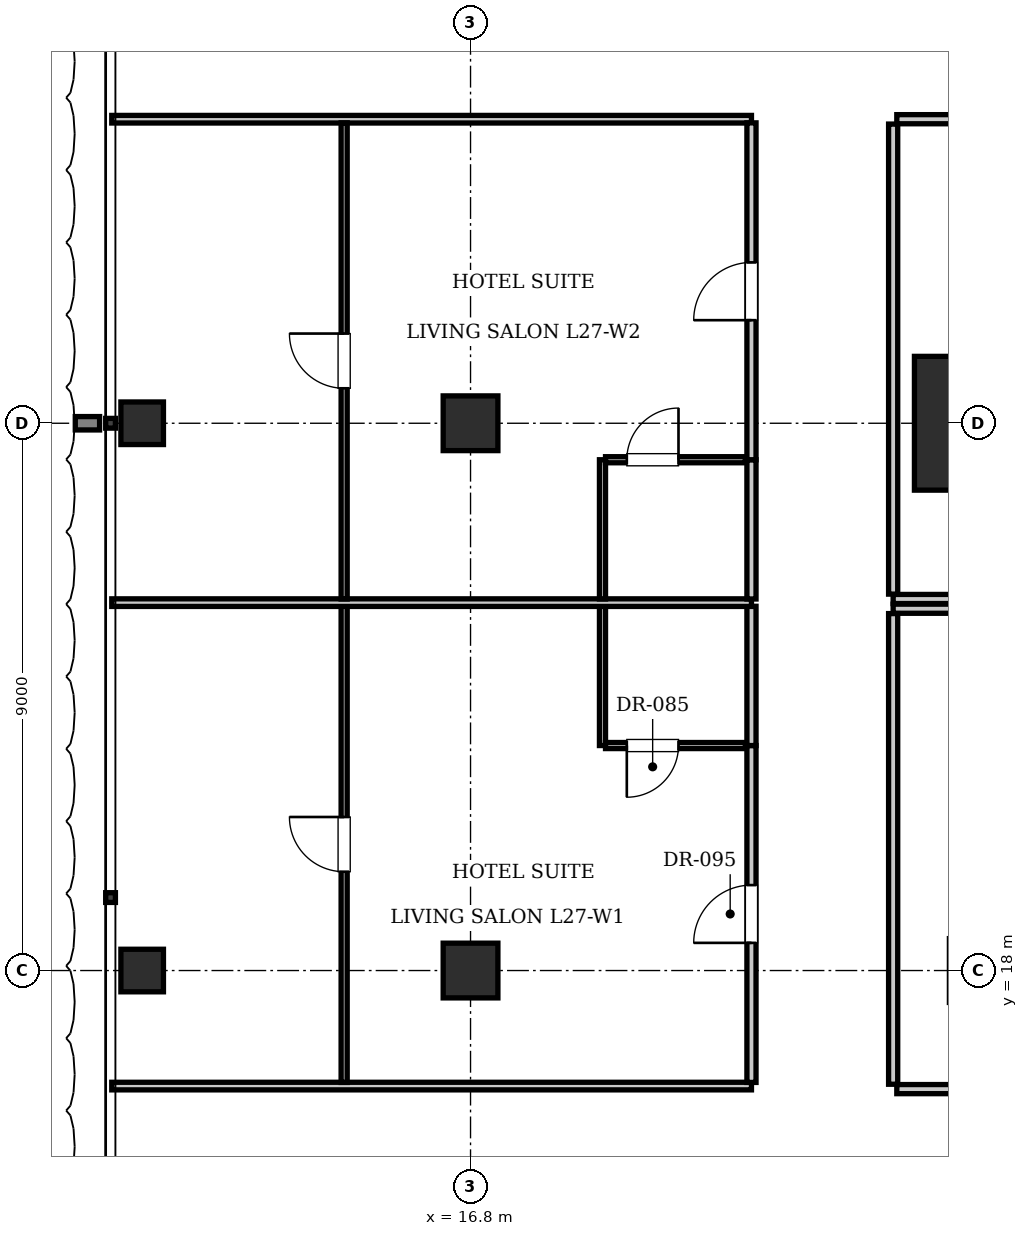
"""IFC4 building model, lengths in metres.
Left out: names, types, materials, properties, quantities, classifications, styles, units other than length and angle.
Written with IfcOpenShell. Run it as: python <this file> out.ifc"""

import sys

from ifc_helpers import new_model, si_unit, direction, frame, frame_2d, origin, origin_2d, place, context, subcontext, project, spatial, rectangle, i_section, extrude, element, fill, save


model = new_model("IFC4")
c1 = context("Model", 3, precision=1e-05, world=origin(), true_north=direction((0.0, 1.0)))
c2 = subcontext(c1, "Body", "Model", "MODEL_VIEW")
j1 = project(units=[si_unit("LENGTHUNIT", "METRE"), si_unit("PLANEANGLEUNIT", "RADIAN")], contexts=[c1])
p1 = place(None, origin())
s1 = spatial("IfcSite", under=j1, at=p1, CompositionType="ELEMENT")
p2 = place(p1, origin())
s2 = spatial("IfcBuilding", under=s1, at=p2, CompositionType="ELEMENT")
p3 = place(p2, frame((0.0, 0.0, 111.65)))
s3 = spatial("IfcBuildingStorey", under=s2, at=p3, CompositionType="ELEMENT", Elevation=111.65)
p4 = place(p3, frame((25.2, 27.0, 0.0), z_axis=(0.0, 0.0, 1.0), x_axis=(1.0, 0.0, 0.0)))
e1 = element("IfcColumn", 1, at=p4, inside=s3, PredefinedType="COLUMN", context=c2, shape_type="SweptSolid", body=[
    extrude(rectangle(XDim=2.2, YDim=2.2, at=origin_2d()), origin(), (0.0, 0.0, 1.0), 3.85),
])
for number, where, z_axis, x_axis in (
    (2, (16.8, 18.0, 0.0), (0.0, 0.0, 1.0), (1.0, 0.0, 0.0)),
    (3, (16.8, 27.0, 0.0), (0.0, 0.0, 1.0), (1.0, 0.0, 0.0)),
):
    element("IfcColumn", number, at=place(p3, frame(where, z_axis=z_axis, x_axis=x_axis)), inside=s3, PredefinedType="COLUMN", context=c2, shape_type="SweptSolid", body=[
        extrude(rectangle(XDim=0.9, YDim=0.9, at=origin_2d()), origin(), (0.0, 0.0, 1.0), 3.85),
    ])
for number, where, z_axis, x_axis in (
    (4, (11.4, 18.0, 0.0), (0.0, 0.0, 1.0), (1.0, 0.0, 0.0)),
    (5, (11.4, 27.0, 0.0), (0.0, 0.0, 1.0), (1.0, 0.0, 0.0)),
):
    element("IfcColumn", number, at=place(p3, frame(where, z_axis=z_axis, x_axis=x_axis)), inside=s3, PredefinedType="COLUMN", context=c2, shape_type="SweptSolid", body=[
        extrude(i_section(OverallWidth=0.7, OverallDepth=0.7, WebThickness=0.028, FlangeThickness=0.044, at=origin_2d()), origin(), (0.0, 0.0, 1.0), 3.85),
    ])
p5 = place(p3, frame((23.75, 24.11, 0.0), z_axis=(0.0, 0.0, 1.0), x_axis=(1.0, 0.0, 0.0)))
e6 = element("IfcWall", 6, at=p5, inside=s3, PredefinedType="PARTITIONING", context=c2, shape_type="SweptSolid", body=[
    extrude(rectangle(XDim=28.1, YDim=0.15, at=frame_2d((14.05, 0.0))), origin(), (0.0, 0.0, 1.0), 3.55),
])
p6 = place(p3, frame((23.75, 24.19, 0.0), z_axis=(0.0, 0.0, 1.0), x_axis=(0.0, 1.0, 0.0)))
e7 = element("IfcWall", 7, at=p6, inside=s3, PredefinedType="PARTITIONING", context=c2, shape_type="SweptSolid", body=[
    extrude(rectangle(XDim=7.73, YDim=0.15, at=frame_2d((3.865, 0.0))), origin(), (0.0, 0.0, 1.0), 3.55),
])
p7 = place(p3, frame((23.81, 32.0, 0.0), z_axis=(0.0, 0.0, 1.0), x_axis=(1.0, 0.0, 0.0)))
e8 = element("IfcWall", 8, at=p7, inside=s3, PredefinedType="PARTITIONING", context=c2, shape_type="SweptSolid", body=[
    extrude(rectangle(XDim=6.373, YDim=0.15, at=frame_2d((3.187, 0.0))), origin(), (0.0, 0.0, 1.0), 3.55),
])
p8 = place(p7, frame((2.737, 0.0, 0.0)))
e9 = element("IfcOpeningElement", 9, at=p8, cuts=e8, PredefinedType="OPENING", context=c2, shape_type="SweptSolid", body=[
    extrude(rectangle(XDim=0.9, YDim=2.1, at=frame_2d((0.45, 1.05))), frame((0.0, 0.085, 0.0), z_axis=(0.0, -1.0, 0.0), x_axis=(1.0, 0.0, 0.0)), (0.0, 0.0, 1.0), 0.17),
])
p9 = place(p3, frame((23.75, 23.95, 0.0), z_axis=(0.0, 0.0, 1.0), x_axis=(1.0, 0.0, 0.0)))
e10 = element("IfcWall", 10, at=p9, inside=s3, PredefinedType="PARTITIONING", context=c2, shape_type="SweptSolid", body=[
    extrude(rectangle(XDim=28.1, YDim=0.15, at=frame_2d((14.05, 0.0))), origin(), (0.0, 0.0, 1.0), 3.55),
])
p10 = place(p3, frame((23.75, 16.13, 0.0), z_axis=(0.0, 0.0, 1.0), x_axis=(0.0, 1.0, 0.0)))
e11 = element("IfcWall", 11, at=p10, inside=s3, PredefinedType="PARTITIONING", context=c2, shape_type="SweptSolid", body=[
    extrude(rectangle(XDim=7.74, YDim=0.15, at=frame_2d((3.87, 0.0))), origin(), (0.0, 0.0, 1.0), 3.55),
])
p11 = place(p3, frame((23.81, 16.05, 0.0), z_axis=(0.0, 0.0, 1.0), x_axis=(1.0, 0.0, 0.0)))
e12 = element("IfcWall", 12, at=p11, inside=s3, PredefinedType="PARTITIONING", context=c2, shape_type="SweptSolid", body=[
    extrude(rectangle(XDim=10.307, YDim=0.15, at=frame_2d((5.153, 0.0))), origin(), (0.0, 0.0, 1.0), 3.55),
])
p12 = place(p11, frame((4.704, 0.0, 0.0)))
e13 = element("IfcOpeningElement", 13, at=p12, cuts=e12, PredefinedType="OPENING", context=c2, shape_type="SweptSolid", body=[
    extrude(rectangle(XDim=0.9, YDim=2.1, at=frame_2d((0.45, 1.05))), frame((0.0, 0.085, 0.0), z_axis=(0.0, -1.0, 0.0), x_axis=(1.0, 0.0, 0.0)), (0.0, 0.0, 1.0), 0.17),
])
for number, where, z_axis, x_axis in (
    (14, (10.9, 16.1, 0.0), (0.0, 0.0, 1.0), (1.0, 0.0, 0.0)),
    (15, (10.9, 32.0, 0.0), (0.0, 0.0, 1.0), (1.0, 0.0, 0.0)),
):
    element("IfcWall", number, at=place(p3, frame(where, z_axis=z_axis, x_axis=x_axis)), inside=s3, PredefinedType="PARTITIONING", context=c2, shape_type="SweptSolid", body=[
        extrude(rectangle(XDim=10.52, YDim=0.125, at=frame_2d((5.26, 0.0))), origin(), (0.0, 0.0, 1.0), 3.55),
    ])
p13 = place(p3, frame((21.42, 16.16, 0.0), z_axis=(0.0, 0.0, 1.0), x_axis=(0.0, 1.0, 0.0)))
e16 = element("IfcWall", 16, at=p13, inside=s3, PredefinedType="PARTITIONING", context=c2, shape_type="SweptSolid", body=[
    extrude(rectangle(XDim=5.54, YDim=0.15, at=frame_2d((2.77, 0.0))), origin(), (0.0, 0.0, 1.0), 3.55),
])
p14 = place(p13, frame((2.295, 0.0, 0.0)))
e17 = element("IfcOpeningElement", 17, at=p14, cuts=e16, PredefinedType="OPENING", context=c2, shape_type="SweptSolid", body=[
    extrude(rectangle(XDim=0.95, YDim=2.15, at=frame_2d((0.475, 1.075))), frame((0.0, 0.085, 0.0), z_axis=(0.0, -1.0, 0.0), x_axis=(1.0, 0.0, 0.0)), (0.0, 0.0, 1.0), 0.17),
])
p15 = place(p3, frame((21.42, 21.7, 0.0), z_axis=(0.0, 0.0, 1.0), x_axis=(0.0, 1.0, 0.0)))
e18 = element("IfcWall", 18, at=p15, inside=s3, PredefinedType="PARTITIONING", context=c2, shape_type="SweptSolid", body=[
    extrude(rectangle(XDim=2.29, YDim=0.15, at=frame_2d((1.145, 0.0))), origin(), (0.0, 0.0, 1.0), 3.55),
])
p16 = place(p3, frame((18.97, 21.7, 0.0), z_axis=(0.0, 0.0, 1.0), x_axis=(0.0, 1.0, 0.0)))
e19 = element("IfcWall", 19, at=p16, inside=s3, PredefinedType="PARTITIONING", context=c2, shape_type="SweptSolid", body=[
    extrude(rectangle(XDim=2.29, YDim=0.1, at=frame_2d((1.145, 0.0))), origin(), (0.0, 0.0, 1.0), 3.55),
])
p17 = place(p3, frame((19.02, 21.7, 0.0), z_axis=(0.0, 0.0, 1.0), x_axis=(1.0, 0.0, 0.0)))
e20 = element("IfcWall", 20, at=p17, inside=s3, PredefinedType="PARTITIONING", context=c2, shape_type="SweptSolid", body=[
    extrude(rectangle(XDim=2.3, YDim=0.1, at=frame_2d((1.15, 0.0))), origin(), (0.0, 0.0, 1.0), 3.55),
])
p18 = place(p17, frame((0.35, 0.0, 0.0)))
e21 = element("IfcOpeningElement", 21, at=p18, cuts=e20, PredefinedType="OPENING", context=c2, shape_type="SweptSolid", body=[
    extrude(rectangle(XDim=0.85, YDim=2.1, at=frame_2d((0.425, 1.05))), frame((0.0, 0.06, 0.0), z_axis=(0.0, -1.0, 0.0), x_axis=(1.0, 0.0, 0.0)), (0.0, 0.0, 1.0), 0.12),
])
p19 = place(p3, frame((14.722, 16.16, 0.0), z_axis=(0.0, 0.0, 1.0), x_axis=(0.0, 1.0, 0.0)))
e22 = element("IfcWall", 22, at=p19, inside=s3, PredefinedType="PARTITIONING", context=c2, shape_type="SweptSolid", body=[
    extrude(rectangle(XDim=7.83, YDim=0.1, at=frame_2d((3.915, 0.0))), origin(), (0.0, 0.0, 1.0), 3.55),
])
p20 = place(p19, frame((3.465, 0.0, 0.0)))
e23 = element("IfcOpeningElement", 23, at=p20, cuts=e22, PredefinedType="OPENING", context=c2, shape_type="SweptSolid", body=[
    extrude(rectangle(XDim=0.9, YDim=2.1, at=frame_2d((0.45, 1.05))), frame((0.0, 0.06, 0.0), z_axis=(0.0, -1.0, 0.0), x_axis=(1.0, 0.0, 0.0)), (0.0, 0.0, 1.0), 0.12),
])
p21 = place(p3, frame((10.9, 24.05, 0.0), z_axis=(0.0, 0.0, 1.0), x_axis=(1.0, 0.0, 0.0)))
e24 = element("IfcWall", 24, at=p21, inside=s3, PredefinedType="PARTITIONING", context=c2, shape_type="SweptSolid", body=[
    extrude(rectangle(XDim=10.52, YDim=0.125, at=frame_2d((5.26, 0.0))), origin(), (0.0, 0.0, 1.0), 3.55),
])
p22 = place(p3, frame((21.42, 24.11, 0.0), z_axis=(0.0, 0.0, 1.0), x_axis=(0.0, 1.0, 0.0)))
e25 = element("IfcWall", 25, at=p22, inside=s3, PredefinedType="PARTITIONING", context=c2, shape_type="SweptSolid", body=[
    extrude(rectangle(XDim=2.29, YDim=0.15, at=frame_2d((1.145, 0.0))), origin(), (0.0, 0.0, 1.0), 3.55),
])
p23 = place(p3, frame((21.42, 26.4, 0.0), z_axis=(0.0, 0.0, 1.0), x_axis=(0.0, 1.0, 0.0)))
e26 = element("IfcWall", 26, at=p23, inside=s3, PredefinedType="PARTITIONING", context=c2, shape_type="SweptSolid", body=[
    extrude(rectangle(XDim=5.54, YDim=0.15, at=frame_2d((2.77, 0.0))), origin(), (0.0, 0.0, 1.0), 3.55),
])
p24 = place(p23, frame((2.295, 0.0, 0.0)))
e27 = element("IfcOpeningElement", 27, at=p24, cuts=e26, PredefinedType="OPENING", context=c2, shape_type="SweptSolid", body=[
    extrude(rectangle(XDim=0.95, YDim=2.15, at=frame_2d((0.475, 1.075))), frame((0.0, 0.085, 0.0), z_axis=(0.0, -1.0, 0.0), x_axis=(1.0, 0.0, 0.0)), (0.0, 0.0, 1.0), 0.17),
])
p25 = place(p3, frame((18.97, 24.11, 0.0), z_axis=(0.0, 0.0, 1.0), x_axis=(0.0, 1.0, 0.0)))
e28 = element("IfcWall", 28, at=p25, inside=s3, PredefinedType="PARTITIONING", context=c2, shape_type="SweptSolid", body=[
    extrude(rectangle(XDim=2.29, YDim=0.1, at=frame_2d((1.145, 0.0))), origin(), (0.0, 0.0, 1.0), 3.55),
])
p26 = place(p3, frame((19.02, 26.4, 0.0), z_axis=(0.0, 0.0, 1.0), x_axis=(1.0, 0.0, 0.0)))
e29 = element("IfcWall", 29, at=p26, inside=s3, PredefinedType="PARTITIONING", context=c2, shape_type="SweptSolid", body=[
    extrude(rectangle(XDim=2.3, YDim=0.1, at=frame_2d((1.15, 0.0))), origin(), (0.0, 0.0, 1.0), 3.55),
])
p27 = place(p26, frame((0.35, 0.0, 0.0)))
e30 = element("IfcOpeningElement", 30, at=p27, cuts=e29, PredefinedType="OPENING", context=c2, shape_type="SweptSolid", body=[
    extrude(rectangle(XDim=0.85, YDim=2.1, at=frame_2d((0.425, 1.05))), frame((0.0, 0.06, 0.0), z_axis=(0.0, -1.0, 0.0), x_axis=(1.0, 0.0, 0.0)), (0.0, 0.0, 1.0), 0.12),
])
p28 = place(p3, frame((14.722, 24.11, 0.0), z_axis=(0.0, 0.0, 1.0), x_axis=(0.0, 1.0, 0.0)))
e31 = element("IfcWall", 31, at=p28, inside=s3, PredefinedType="PARTITIONING", context=c2, shape_type="SweptSolid", body=[
    extrude(rectangle(XDim=7.83, YDim=0.1, at=frame_2d((3.915, 0.0))), origin(), (0.0, 0.0, 1.0), 3.55),
])
p29 = place(p28, frame((3.465, 0.0, 0.0)))
e32 = element("IfcOpeningElement", 32, at=p29, cuts=e31, PredefinedType="OPENING", context=c2, shape_type="SweptSolid", body=[
    extrude(rectangle(XDim=0.9, YDim=2.1, at=frame_2d((0.45, 1.05))), frame((0.0, 0.06, 0.0), z_axis=(0.0, -1.0, 0.0), x_axis=(1.0, 0.0, 0.0)), (0.0, 0.0, 1.0), 0.12),
])
p30 = place(p18, frame((0.85, 0.0, 0.0), z_axis=(0.0, 0.0, 1.0), x_axis=(-1.0, 0.0, 0.0)))
e33 = element("IfcDoor", 33, at=p30, inside=s3, OperationType="SINGLE_SWING_RIGHT", PredefinedType="DOOR", context=c2, shape_type="SweptSolid", body=[
    extrude(rectangle(XDim=0.85, YDim=2.1, at=frame_2d((0.425, 1.05))), frame((0.0, 0.025, 0.0), z_axis=(0.0, -1.0, 0.0), x_axis=(1.0, 0.0, 0.0)), (0.0, 0.0, 1.0), 0.05),
])
fill(e21, e33)
p31 = place(p14, origin())
e34 = element("IfcDoor", 34, at=p31, inside=s3, OperationType="SINGLE_SWING_LEFT", PredefinedType="DOOR", context=c2, shape_type="SweptSolid", body=[
    extrude(rectangle(XDim=0.95, YDim=2.15, at=frame_2d((0.475, 1.075))), frame((0.0, 0.025, 0.0), z_axis=(0.0, -1.0, 0.0), x_axis=(1.0, 0.0, 0.0)), (0.0, 0.0, 1.0), 0.05),
])
fill(e17, e34)
p32 = place(p20, origin())
e35 = element("IfcDoor", 35, at=p32, inside=s3, OperationType="SINGLE_SWING_RIGHT", PredefinedType="DOOR", context=c2, shape_type="SweptSolid", body=[
    extrude(rectangle(XDim=0.9, YDim=2.1, at=frame_2d((0.45, 1.05))), frame((0.0, 0.025, 0.0), z_axis=(0.0, -1.0, 0.0), x_axis=(1.0, 0.0, 0.0)), (0.0, 0.0, 1.0), 0.05),
])
fill(e23, e35)
p33 = place(p27, origin())
e36 = element("IfcDoor", 36, at=p33, inside=s3, OperationType="SINGLE_SWING_RIGHT", PredefinedType="DOOR", context=c2, shape_type="SweptSolid", body=[
    extrude(rectangle(XDim=0.85, YDim=2.1, at=frame_2d((0.425, 1.05))), frame((0.0, 0.025, 0.0), z_axis=(0.0, -1.0, 0.0), x_axis=(1.0, 0.0, 0.0)), (0.0, 0.0, 1.0), 0.05),
])
fill(e30, e36)
p34 = place(p24, origin())
e37 = element("IfcDoor", 37, at=p34, inside=s3, OperationType="SINGLE_SWING_LEFT", PredefinedType="DOOR", context=c2, shape_type="SweptSolid", body=[
    extrude(rectangle(XDim=0.95, YDim=2.15, at=frame_2d((0.475, 1.075))), frame((0.0, 0.025, 0.0), z_axis=(0.0, -1.0, 0.0), x_axis=(1.0, 0.0, 0.0)), (0.0, 0.0, 1.0), 0.05),
])
fill(e27, e37)
p35 = place(p29, origin())
e38 = element("IfcDoor", 38, at=p35, inside=s3, OperationType="SINGLE_SWING_RIGHT", PredefinedType="DOOR", context=c2, shape_type="SweptSolid", body=[
    extrude(rectangle(XDim=0.9, YDim=2.1, at=frame_2d((0.45, 1.05))), frame((0.0, 0.025, 0.0), z_axis=(0.0, -1.0, 0.0), x_axis=(1.0, 0.0, 0.0)), (0.0, 0.0, 1.0), 0.05),
])
fill(e32, e38)
save(model, sys.argv[1])
